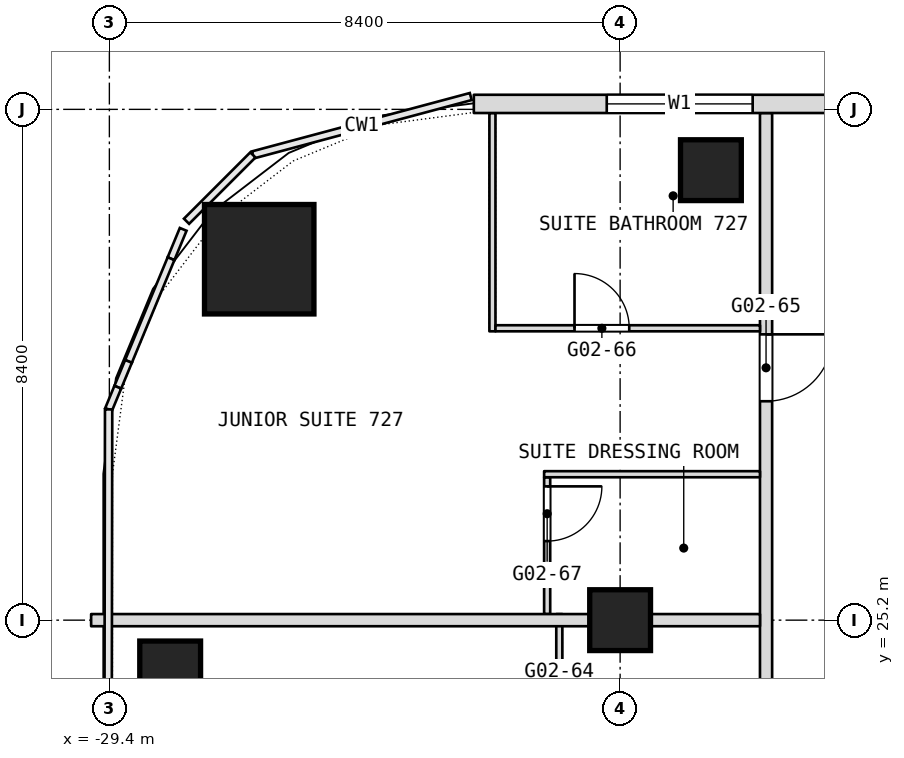
"""IFC4 building model, lengths in metres.
Left out: names, types, materials, properties, quantities, classifications, styles, units other than length and angle.
Written with IfcOpenShell. Run it as: python <this file> out.ifc"""

import sys

from ifc_helpers import new_model, si_unit, direction, frame, frame_2d, origin, origin_2d, place, context, subcontext, project, spatial, rectangle, extrude, element, fill, save


model = new_model("IFC4")
c1 = context("Model", 3, precision=1e-05, world=origin(), true_north=direction((0.0, 1.0)))
c2 = subcontext(c1, "Body", "Model", "MODEL_VIEW")
j1 = project(units=[si_unit("LENGTHUNIT", "METRE"), si_unit("PLANEANGLEUNIT", "RADIAN")], contexts=[c1])
p1 = place(None, origin())
s1 = spatial("IfcSite", under=j1, at=p1, CompositionType="ELEMENT")
p2 = place(p1, origin())
s2 = spatial("IfcBuilding", under=s1, at=p2, CompositionType="ELEMENT")
p3 = place(p2, frame((0.0, 0.0, 40.1)))
s3 = spatial("IfcBuildingStorey", under=s2, at=p3, CompositionType="ELEMENT", Elevation=40.1)
p4 = place(p3, frame((-26.936, 31.135, 0.0), z_axis=(0.0, 0.0, 1.0), x_axis=(1.0, 0.0, 0.0)))
e1 = element("IfcColumn", 1, at=p4, inside=s3, PredefinedType="COLUMN", context=c2, shape_type="SweptSolid", body=[
    extrude(rectangle(XDim=1.8, YDim=1.8, at=origin_2d()), origin(), (0.0, 0.0, 1.0), 3.6),
])
for number, where, z_axis, x_axis in (
    (2, (-21.0, 25.2, 0.0), (0.0, 0.0, 1.0), (1.0, 0.0, 0.0)),
    (3, (-28.4, 24.356, 0.0), (0.0, 0.0, 1.0), (1.0, 0.0, 0.0)),
    (4, (-19.507, 32.6, 0.0), (0.0, 0.0, 1.0), (1.0, 0.0, 0.0)),
):
    element("IfcColumn", number, at=place(p3, frame(where, z_axis=z_axis, x_axis=x_axis)), inside=s3, PredefinedType="COLUMN", context=c2, shape_type="SweptSolid", body=[
        extrude(rectangle(XDim=1.0, YDim=1.0, at=origin_2d()), origin(), (0.0, 0.0, 1.0), 3.6),
    ])
p5 = place(p3, frame((-18.6, 18.5, 0.0), z_axis=(0.0, 0.0, 1.0), x_axis=(0.0, 1.0, 0.0)))
e5 = element("IfcWall", 5, at=p5, inside=s3, PredefinedType="PARTITIONING", context=c2, shape_type="SweptSolid", body=[
    extrude(rectangle(XDim=15.04, YDim=0.2, at=frame_2d((7.52, 0.0))), origin(), (0.0, 0.0, 1.0), 3.34),
])
p6 = place(p5, frame((2.9, 0.0, 0.0)))
e6 = element("IfcOpeningElement", 6, at=p6, cuts=e5, PredefinedType="OPENING", context=c2, shape_type="SweptSolid", body=[
    extrude(rectangle(XDim=1.0, YDim=2.1, at=frame_2d((0.5, 1.05))), frame((0.0, 0.1, 0.0), z_axis=(0.0, -1.0, 0.0), x_axis=(1.0, 0.0, 0.0)), (0.0, 0.0, 1.0), 0.2),
])
p7 = place(p5, frame((10.3, 0.0, 0.0)))
e7 = element("IfcOpeningElement", 7, at=p7, cuts=e5, PredefinedType="OPENING", context=c2, shape_type="SweptSolid", body=[
    extrude(rectangle(XDim=1.1, YDim=2.1, at=frame_2d((0.55, 1.05))), frame((0.0, 0.1, 0.0), z_axis=(0.0, -1.0, 0.0), x_axis=(1.0, 0.0, 0.0)), (0.0, 0.0, 1.0), 0.2),
])
p8 = place(p3, frame((-22.0, 22.75, 0.0), z_axis=(0.0, 0.0, 1.0), x_axis=(0.0, 1.0, 0.0)))
e8 = element("IfcWall", 8, at=p8, inside=s3, PredefinedType="PARTITIONING", context=c2, shape_type="SweptSolid", body=[
    extrude(rectangle(XDim=2.55, YDim=0.1, at=frame_2d((1.275, 0.0))), origin(), (0.0, 0.0, 1.0), 3.34),
])
p9 = place(p8, frame((0.15, 0.0, 0.0)))
e9 = element("IfcOpeningElement", 9, at=p9, cuts=e8, PredefinedType="OPENING", context=c2, shape_type="SweptSolid", body=[
    extrude(rectangle(XDim=0.9, YDim=2.1, at=frame_2d((0.45, 1.05))), frame((0.0, 0.05, 0.0), z_axis=(0.0, -1.0, 0.0), x_axis=(1.0, 0.0, 0.0)), (0.0, 0.0, 1.0), 0.1),
])
p10 = place(p3, frame((-22.2, 25.3, 0.0), z_axis=(0.0, 0.0, 1.0), x_axis=(0.0, 1.0, 0.0)))
e10 = element("IfcWall", 10, at=p10, inside=s3, PredefinedType="PARTITIONING", context=c2, shape_type="SweptSolid", body=[
    extrude(rectangle(XDim=2.25, YDim=0.1, at=frame_2d((1.125, 0.0))), origin(), (0.0, 0.0, 1.0), 3.34),
])
p11 = place(p10, frame((1.2, 0.0, 0.0)))
e11 = element("IfcOpeningElement", 11, at=p11, cuts=e10, PredefinedType="OPENING", context=c2, shape_type="SweptSolid", body=[
    extrude(rectangle(XDim=0.9, YDim=2.1, at=frame_2d((0.45, 1.05))), frame((0.0, 0.05, 0.0), z_axis=(0.0, -1.0, 0.0), x_axis=(1.0, 0.0, 0.0)), (0.0, 0.0, 1.0), 0.1),
])
p12 = place(p3, frame((-23.1, 29.95, 0.0), z_axis=(0.0, 0.0, 1.0), x_axis=(0.0, 1.0, 0.0)))
e12 = element("IfcWall", 12, at=p12, inside=s3, PredefinedType="PARTITIONING", context=c2, shape_type="SweptSolid", body=[
    extrude(rectangle(XDim=3.59, YDim=0.1, at=frame_2d((1.795, 0.0))), origin(), (0.0, 0.0, 1.0), 3.34),
])
p13 = place(p3, frame((-29.7, 25.2, 0.0), z_axis=(0.0, 0.0, 1.0), x_axis=(1.0, 0.0, 0.0)))
e13 = element("IfcWall", 13, at=p13, inside=s3, PredefinedType="PARTITIONING", context=c2, shape_type="SweptSolid", body=[
    extrude(rectangle(XDim=11.0, YDim=0.2, at=frame_2d((5.5, 0.0))), origin(), (0.0, 0.0, 1.0), 2.84),
])
p14 = place(p3, frame((-22.25, 27.6, 0.0), z_axis=(0.0, 0.0, 1.0), x_axis=(1.0, 0.0, 0.0)))
e14 = element("IfcWall", 14, at=p14, inside=s3, PredefinedType="PARTITIONING", context=c2, shape_type="SweptSolid", body=[
    extrude(rectangle(XDim=3.55, YDim=0.1, at=frame_2d((1.775, 0.0))), origin(), (0.0, 0.0, 1.0), 3.34),
])
p15 = place(p3, frame((-23.05, 30.0, 0.0), z_axis=(0.0, 0.0, 1.0), x_axis=(1.0, 0.0, 0.0)))
e15 = element("IfcWall", 15, at=p15, inside=s3, PredefinedType="PARTITIONING", context=c2, shape_type="SweptSolid", body=[
    extrude(rectangle(XDim=4.35, YDim=0.1, at=frame_2d((2.175, 0.0))), origin(), (0.0, 0.0, 1.0), 3.34),
])
p16 = place(p15, frame((1.3, 0.0, 0.0)))
e16 = element("IfcOpeningElement", 16, at=p16, cuts=e15, PredefinedType="OPENING", context=c2, shape_type="SweptSolid", body=[
    extrude(rectangle(XDim=0.9, YDim=2.1, at=frame_2d((0.45, 1.05))), frame((0.0, 0.05, 0.0), z_axis=(0.0, -1.0, 0.0), x_axis=(1.0, 0.0, 0.0)), (0.0, 0.0, 1.0), 0.1),
])
p17 = place(p3, frame((23.406, 33.69, 0.0), z_axis=(0.0, 0.0, 1.0), x_axis=(-1.0, 0.0, 0.0)))
e17 = element("IfcWall", 17, at=p17, inside=s3, PredefinedType="NOTDEFINED", context=c2, shape_type="SweptSolid", body=[
    extrude(rectangle(XDim=46.812, YDim=0.3, at=frame_2d((23.406, 0.0))), origin(), (0.0, 0.0, 1.0), 3.6),
])
p18 = place(p17, frame((2.186, 0.0, 0.9)))
e18 = element("IfcOpeningElement", 18, at=p18, cuts=e17, PredefinedType="OPENING", context=c2, shape_type="SweptSolid", body=[
    extrude(rectangle(XDim=2.4, YDim=2.1, at=frame_2d((1.2, 1.05))), frame((0.0, 0.15, 0.0), z_axis=(0.0, -1.0, 0.0), x_axis=(1.0, 0.0, 0.0)), (0.0, 0.0, 1.0), 0.3),
])
p19 = place(p17, frame((7.506, 0.0, 0.9)))
e19 = element("IfcOpeningElement", 19, at=p19, cuts=e17, PredefinedType="OPENING", context=c2, shape_type="SweptSolid", body=[
    extrude(rectangle(XDim=2.4, YDim=2.1, at=frame_2d((1.2, 1.05))), frame((0.0, 0.15, 0.0), z_axis=(0.0, -1.0, 0.0), x_axis=(1.0, 0.0, 0.0)), (0.0, 0.0, 1.0), 0.3),
])
p20 = place(p17, frame((11.706, 0.0, 0.9)))
e20 = element("IfcOpeningElement", 20, at=p20, cuts=e17, PredefinedType="OPENING", context=c2, shape_type="SweptSolid", body=[
    extrude(rectangle(XDim=2.4, YDim=2.1, at=frame_2d((1.2, 1.05))), frame((0.0, 0.15, 0.0), z_axis=(0.0, -1.0, 0.0), x_axis=(1.0, 0.0, 0.0)), (0.0, 0.0, 1.0), 0.3),
])
p21 = place(p17, frame((15.906, 0.0, 0.9)))
e21 = element("IfcOpeningElement", 21, at=p21, cuts=e17, PredefinedType="OPENING", context=c2, shape_type="SweptSolid", body=[
    extrude(rectangle(XDim=2.4, YDim=2.1, at=frame_2d((1.2, 1.05))), frame((0.0, 0.15, 0.0), z_axis=(0.0, -1.0, 0.0), x_axis=(1.0, 0.0, 0.0)), (0.0, 0.0, 1.0), 0.3),
])
p22 = place(p17, frame((20.106, 0.0, 0.9)))
e22 = element("IfcOpeningElement", 22, at=p22, cuts=e17, PredefinedType="OPENING", context=c2, shape_type="SweptSolid", body=[
    extrude(rectangle(XDim=2.4, YDim=2.1, at=frame_2d((1.2, 1.05))), frame((0.0, 0.15, 0.0), z_axis=(0.0, -1.0, 0.0), x_axis=(1.0, 0.0, 0.0)), (0.0, 0.0, 1.0), 0.3),
])
p23 = place(p17, frame((24.306, 0.0, 0.9)))
e23 = element("IfcOpeningElement", 23, at=p23, cuts=e17, PredefinedType="OPENING", context=c2, shape_type="SweptSolid", body=[
    extrude(rectangle(XDim=2.4, YDim=2.1, at=frame_2d((1.2, 1.05))), frame((0.0, 0.15, 0.0), z_axis=(0.0, -1.0, 0.0), x_axis=(1.0, 0.0, 0.0)), (0.0, 0.0, 1.0), 0.3),
])
p24 = place(p17, frame((28.506, 0.0, 0.9)))
e24 = element("IfcOpeningElement", 24, at=p24, cuts=e17, PredefinedType="OPENING", context=c2, shape_type="SweptSolid", body=[
    extrude(rectangle(XDim=2.4, YDim=2.1, at=frame_2d((1.2, 1.05))), frame((0.0, 0.15, 0.0), z_axis=(0.0, -1.0, 0.0), x_axis=(1.0, 0.0, 0.0)), (0.0, 0.0, 1.0), 0.3),
])
p25 = place(p17, frame((32.706, 0.0, 0.9)))
e25 = element("IfcOpeningElement", 25, at=p25, cuts=e17, PredefinedType="OPENING", context=c2, shape_type="SweptSolid", body=[
    extrude(rectangle(XDim=2.4, YDim=2.1, at=frame_2d((1.2, 1.05))), frame((0.0, 0.15, 0.0), z_axis=(0.0, -1.0, 0.0), x_axis=(1.0, 0.0, 0.0)), (0.0, 0.0, 1.0), 0.3),
])
p26 = place(p17, frame((36.906, 0.0, 0.9)))
e26 = element("IfcOpeningElement", 26, at=p26, cuts=e17, PredefinedType="OPENING", context=c2, shape_type="SweptSolid", body=[
    extrude(rectangle(XDim=2.4, YDim=2.1, at=frame_2d((1.2, 1.05))), frame((0.0, 0.15, 0.0), z_axis=(0.0, -1.0, 0.0), x_axis=(1.0, 0.0, 0.0)), (0.0, 0.0, 1.0), 0.3),
])
p27 = place(p17, frame((42.226, 0.0, 0.9)))
e27 = element("IfcOpeningElement", 27, at=p27, cuts=e17, PredefinedType="OPENING", context=c2, shape_type="SweptSolid", body=[
    extrude(rectangle(XDim=2.4, YDim=2.1, at=frame_2d((1.2, 1.05))), frame((0.0, 0.15, 0.0), z_axis=(0.0, -1.0, 0.0), x_axis=(1.0, 0.0, 0.0)), (0.0, 0.0, 1.0), 0.3),
])
p28 = place(p7, origin())
e28 = element("IfcDoor", 28, at=p28, inside=s3, OperationType="SINGLE_SWING_RIGHT", PredefinedType="DOOR", context=c2, shape_type="SweptSolid", body=[
    extrude(rectangle(XDim=1.1, YDim=2.1, at=frame_2d((0.55, 1.05))), frame((0.0, 0.025, 0.0), z_axis=(0.0, -1.0, 0.0), x_axis=(1.0, 0.0, 0.0)), (0.0, 0.0, 1.0), 0.05),
])
fill(e7, e28)
p29 = place(p11, origin())
e29 = element("IfcDoor", 29, at=p29, inside=s3, OperationType="SINGLE_SWING_LEFT", PredefinedType="DOOR", context=c2, shape_type="SweptSolid", body=[
    extrude(rectangle(XDim=0.9, YDim=2.1, at=frame_2d((0.45, 1.05))), frame((0.0, 0.025, 0.0), z_axis=(0.0, -1.0, 0.0), x_axis=(1.0, 0.0, 0.0)), (0.0, 0.0, 1.0), 0.05),
])
fill(e11, e29)
p30 = place(p16, origin())
e30 = element("IfcDoor", 30, at=p30, inside=s3, OperationType="SINGLE_SWING_LEFT", PredefinedType="DOOR", context=c2, shape_type="SweptSolid", body=[
    extrude(rectangle(XDim=0.9, YDim=2.1, at=frame_2d((0.45, 1.05))), frame((0.0, 0.025, 0.0), z_axis=(0.0, -1.0, 0.0), x_axis=(1.0, 0.0, 0.0)), (0.0, 0.0, 1.0), 0.05),
])
fill(e16, e30)
p31 = place(p27, origin())
e31 = element("IfcWindow", 31, at=p31, inside=s3, PartitioningType="SINGLE_PANEL", PredefinedType="WINDOW", context=c2, shape_type="SweptSolid", body=[
    extrude(rectangle(XDim=2.4, YDim=2.1, at=frame_2d((1.2, 1.05))), frame((0.0, 0.03, 0.0), z_axis=(0.0, -1.0, 0.0), x_axis=(1.0, 0.0, 0.0)), (0.0, 0.0, 1.0), 0.06),
])
fill(e27, e31)
save(model, sys.argv[1])
